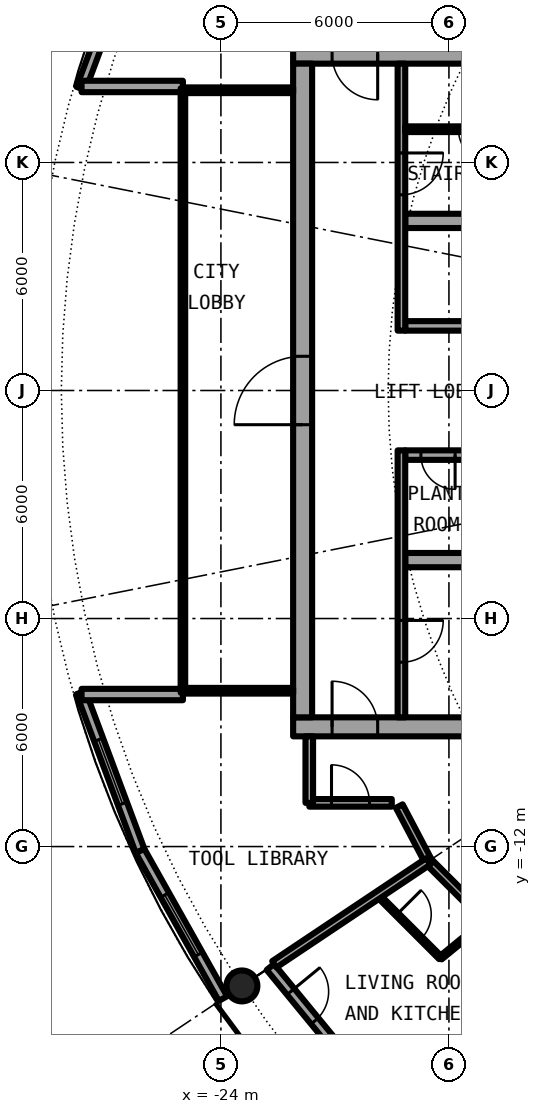
"""IFC4 building model, lengths in metres.
Left out: names, types, materials, properties, quantities, classifications, styles, units other than length and angle.
Written with IfcOpenShell. Run it as: python <this file> out.ifc"""

import sys

from ifc_helpers import new_model, si_unit, direction, frame, frame_2d, origin, origin_2d, place, context, subcontext, project, spatial, rectangle, hollow_circle, extrude, element, fill, save


model = new_model("IFC4")
c1 = context("Model", 3, precision=1e-05, world=origin(), true_north=direction((0.0, 1.0)))
c2 = subcontext(c1, "Body", "Model", "MODEL_VIEW")
j1 = project(units=[si_unit("LENGTHUNIT", "METRE"), si_unit("PLANEANGLEUNIT", "RADIAN")], contexts=[c1])
p1 = place(None, origin())
s1 = spatial("IfcSite", under=j1, at=p1, CompositionType="ELEMENT")
p2 = place(p1, origin())
s2 = spatial("IfcBuilding", under=s1, at=p2, CompositionType="ELEMENT")
p3 = place(p2, frame((0.0, 0.0, 170.75)))
s3 = spatial("IfcBuildingStorey", under=s2, at=p3, CompositionType="ELEMENT", Elevation=170.75)
p4 = place(p3, frame((-23.448, -15.667, 0.0), z_axis=(0.0, 0.0, 1.0), x_axis=(1.0, 0.0, 0.0)))
e1 = element("IfcColumn", 1, at=p4, inside=s3, PredefinedType="COLUMN", context=c2, shape_type="SweptSolid", body=[
    extrude(hollow_circle(Radius=0.406, WallThickness=0.04, at=origin_2d()), origin(), (0.0, 0.0, 1.0), 3.05),
])
p5 = place(p3, frame((-22.699, -15.167, 0.0), z_axis=(0.0, 0.0, 1.0), x_axis=(0.634382322723, -0.773019449054, 0.0)))
e2 = element("IfcWall", 2, at=p5, inside=s3, PredefinedType="SOLIDWALL", context=c2, shape_type="SweptSolid", body=[
    extrude(rectangle(XDim=5.352, YDim=0.25, at=frame_2d((2.676, 0.0))), origin(), (0.0, 0.0, 1.0), 2.7),
])
p6 = place(p5, frame((0.841, 0.0, 0.0)))
e3 = element("IfcOpeningElement", 3, at=p6, cuts=e2, PredefinedType="OPENING", context=c2, shape_type="SweptSolid", body=[
    extrude(rectangle(XDim=1.0, YDim=2.2, at=frame_2d((0.5, 1.1))), frame((0.0, 0.135, 0.0), z_axis=(0.0, -1.0, 0.0), x_axis=(1.0, 0.0, 0.0)), (0.0, 0.0, 1.0), 0.27),
])
p7 = place(p5, frame((3.111, 0.0, 0.3)))
e4 = element("IfcOpeningElement", 4, at=p7, cuts=e2, PredefinedType="OPENING", context=c2, shape_type="SweptSolid", body=[
    extrude(rectangle(XDim=1.8, YDim=2.1, at=frame_2d((0.9, 1.05))), frame((0.0, 0.135, 0.0), z_axis=(0.0, -1.0, 0.0), x_axis=(1.0, 0.0, 0.0)), (0.0, 0.0, 1.0), 0.27),
])
p8 = place(p3, frame((-27.682, -7.945, 0.0), z_axis=(0.0, 0.0, 1.0), x_axis=(0.349247811493, -0.937030397675, 0.0)))
e5 = element("IfcWall", 5, at=p8, inside=s3, PredefinedType="SOLIDWALL", context=c2, shape_type="SweptSolid", body=[
    extrude(rectangle(XDim=4.452, YDim=0.25, at=frame_2d((2.226, 0.0))), origin(), (0.0, 0.0, 1.0), 2.7),
])
p9 = place(p8, frame((1.327, 0.0, 0.3)))
e6 = element("IfcOpeningElement", 6, at=p9, cuts=e5, PredefinedType="OPENING", context=c2, shape_type="SweptSolid", body=[
    extrude(rectangle(XDim=1.8, YDim=2.1, at=frame_2d((0.9, 1.05))), frame((0.0, 0.135, 0.0), z_axis=(0.0, -1.0, 0.0), x_axis=(1.0, 0.0, 0.0)), (0.0, 0.0, 1.0), 0.27),
])
p10 = place(p3, frame((-26.127, -12.117, 0.0), z_axis=(0.0, 0.0, 1.0), x_axis=(0.489696356642, -0.871893042919, 0.0)))
e7 = element("IfcWall", 7, at=p10, inside=s3, PredefinedType="SOLIDWALL", context=c2, shape_type="SweptSolid", body=[
    extrude(rectangle(XDim=4.454, YDim=0.25, at=frame_2d((2.227, 0.0))), origin(), (0.0, 0.0, 1.0), 2.7),
])
p11 = place(p10, frame((1.327, 0.0, 0.3)))
e8 = element("IfcOpeningElement", 8, at=p11, cuts=e7, PredefinedType="OPENING", context=c2, shape_type="SweptSolid", body=[
    extrude(rectangle(XDim=1.8, YDim=2.1, at=frame_2d((0.9, 1.05))), frame((0.0, 0.135, 0.0), z_axis=(0.0, -1.0, 0.0), x_axis=(1.0, 0.0, 0.0)), (0.0, 0.0, 1.0), 0.27),
])
p12 = place(p3, frame((-26.127, 12.117, 0.0), z_axis=(0.0, 0.0, 1.0), x_axis=(-0.349247811493, -0.937030397675, 0.0)))
e9 = element("IfcWall", 9, at=p12, inside=s3, PredefinedType="SOLIDWALL", context=c2, shape_type="SweptSolid", body=[
    extrude(rectangle(XDim=4.452, YDim=0.25, at=frame_2d((2.226, 0.0))), origin(), (0.0, 0.0, 1.0), 2.7),
])
p13 = place(p12, frame((1.327, 0.0, 0.3)))
e10 = element("IfcOpeningElement", 10, at=p13, cuts=e9, PredefinedType="OPENING", context=c2, shape_type="SweptSolid", body=[
    extrude(rectangle(XDim=1.8, YDim=2.1, at=frame_2d((0.9, 1.05))), frame((0.0, 0.135, 0.0), z_axis=(0.0, -1.0, 0.0), x_axis=(1.0, 0.0, 0.0)), (0.0, 0.0, 1.0), 0.27),
])
for number, where, z_axis, x_axis in (
    (11, (-25.0, 8.0, 0.0), (0.0, 0.0, 1.0), (-1.0, 0.0, 0.0)),
    (12, (-25.0, -8.0, 0.0), (0.0, 0.0, 1.0), (-1.0, 0.0, 0.0)),
):
    element("IfcWall", number, at=place(p3, frame(where, z_axis=z_axis, x_axis=x_axis)), inside=s3, PredefinedType="SOLIDWALL", context=c2, shape_type="SweptSolid", body=[
        extrude(rectangle(XDim=2.667, YDim=0.3, at=frame_2d((1.333, 0.0))), origin(), (0.0, 0.0, 1.0), 2.7),
    ])
p14 = place(p3, frame((-22.1, -8.85, 0.0), z_axis=(0.0, 0.0, 1.0), x_axis=(1.0, 0.0, 0.0)))
e13 = element("IfcWall", 13, at=p14, inside=s3, PredefinedType="SHEAR", context=c2, shape_type="SweptSolid", body=[
    extrude(rectangle(XDim=13.6, YDim=0.5, at=frame_2d((6.8, 0.0))), origin(), (0.0, 0.0, 1.0), 3.05),
])
p15 = place(p14, frame((1.025, 0.0, 0.0)))
e14 = element("IfcOpeningElement", 14, at=p15, cuts=e13, PredefinedType="OPENING", context=c2, shape_type="SweptSolid", body=[
    extrude(rectangle(XDim=1.2, YDim=2.3, at=frame_2d((0.6, 1.15))), frame((0.0, 0.26, 0.0), z_axis=(0.0, -1.0, 0.0), x_axis=(1.0, 0.0, 0.0)), (0.0, 0.0, 1.0), 0.52),
])
p16 = place(p3, frame((-8.5, 8.85, 0.0), z_axis=(0.0, 0.0, 1.0), x_axis=(-1.0, 0.0, 0.0)))
e15 = element("IfcWall", 15, at=p16, inside=s3, PredefinedType="SHEAR", context=c2, shape_type="SweptSolid", body=[
    extrude(rectangle(XDim=13.6, YDim=0.5, at=frame_2d((6.8, 0.0))), origin(), (0.0, 0.0, 1.0), 3.05),
])
p17 = place(p16, frame((11.375, 0.0, 0.0)))
e16 = element("IfcOpeningElement", 16, at=p17, cuts=e15, PredefinedType="OPENING", context=c2, shape_type="SweptSolid", body=[
    extrude(rectangle(XDim=1.2, YDim=2.3, at=frame_2d((0.6, 1.15))), frame((0.0, 0.26, 0.0), z_axis=(0.0, -1.0, 0.0), x_axis=(1.0, 0.0, 0.0)), (0.0, 0.0, 1.0), 0.52),
])
p18 = place(p3, frame((-21.85, -8.6, 0.0), z_axis=(0.0, 0.0, 1.0), x_axis=(0.0, 1.0, 0.0)))
e17 = element("IfcWall", 17, at=p18, inside=s3, PredefinedType="SHEAR", context=c2, shape_type="SweptSolid", body=[
    extrude(rectangle(XDim=17.2, YDim=0.5, at=frame_2d((8.6, 0.0))), origin(), (0.0, 0.0, 1.0), 3.05),
])
p19 = place(p18, frame((7.7, 0.0, 0.0)))
e18 = element("IfcOpeningElement", 18, at=p19, cuts=e17, PredefinedType="OPENING", context=c2, shape_type="SweptSolid", body=[
    extrude(rectangle(XDim=1.8, YDim=2.3, at=frame_2d((0.9, 1.15))), frame((0.0, 0.26, 0.0), z_axis=(0.0, -1.0, 0.0), x_axis=(1.0, 0.0, 0.0)), (0.0, 0.0, 1.0), 0.52),
])
p20 = place(p3, frame((-9.0, -1.7, 0.0), z_axis=(0.0, 0.0, 1.0), x_axis=(-1.0, 0.0, 0.0)))
e19 = element("IfcWall", 19, at=p20, inside=s3, PredefinedType="SHEAR", context=c2, shape_type="SweptSolid", body=[
    extrude(rectangle(XDim=10.15, YDim=0.25, at=frame_2d((5.075, 0.0))), origin(), (0.0, 0.0, 1.0), 3.05),
])
p21 = place(p20, frame((1.663, 0.0, 0.0)))
e20 = element("IfcOpeningElement", 20, at=p21, cuts=e19, PredefinedType="OPENING", context=c2, shape_type="SweptSolid", body=[
    extrude(rectangle(XDim=0.9, YDim=2.3, at=frame_2d((0.45, 1.15))), frame((0.0, 0.135, 0.0), z_axis=(0.0, -1.0, 0.0), x_axis=(1.0, 0.0, 0.0)), (0.0, 0.0, 1.0), 0.27),
])
p22 = place(p20, frame((4.675, 0.0, 0.0)))
e21 = element("IfcOpeningElement", 21, at=p22, cuts=e19, PredefinedType="OPENING", context=c2, shape_type="SweptSolid", body=[
    extrude(rectangle(XDim=0.9, YDim=2.3, at=frame_2d((0.45, 1.15))), frame((0.0, 0.135, 0.0), z_axis=(0.0, -1.0, 0.0), x_axis=(1.0, 0.0, 0.0)), (0.0, 0.0, 1.0), 0.27),
])
p23 = place(p20, frame((8.837, 0.0, 0.0)))
e22 = element("IfcOpeningElement", 22, at=p23, cuts=e19, PredefinedType="OPENING", context=c2, shape_type="SweptSolid", body=[
    extrude(rectangle(XDim=0.9, YDim=2.3, at=frame_2d((0.45, 1.15))), frame((0.0, 0.135, 0.0), z_axis=(0.0, -1.0, 0.0), x_axis=(1.0, 0.0, 0.0)), (0.0, 0.0, 1.0), 0.27),
])
p24 = place(p3, frame((-9.0, -4.462, 0.0), z_axis=(0.0, 0.0, 1.0), x_axis=(-1.0, 0.0, 0.0)))
e23 = element("IfcWall", 23, at=p24, inside=s3, PredefinedType="SHEAR", context=c2, shape_type="SweptSolid", body=[
    extrude(rectangle(XDim=10.15, YDim=0.375, at=frame_2d((5.075, 0.0))), origin(), (0.0, 0.0, 1.0), 3.05),
])
p25 = place(p24, frame((6.6, 0.0, 0.0)))
e24 = element("IfcOpeningElement", 24, at=p25, cuts=e23, PredefinedType="OPENING", context=c2, shape_type="SweptSolid", body=[
    extrude(rectangle(XDim=1.1, YDim=2.3, at=frame_2d((0.55, 1.15))), frame((0.0, 0.198, 0.0), z_axis=(0.0, -1.0, 0.0), x_axis=(1.0, 0.0, 0.0)), (0.0, 0.0, 1.0), 0.395),
])
p26 = place(p3, frame((-19.25, -1.575, 0.0), z_axis=(0.0, 0.0, 1.0), x_axis=(0.0, -1.0, 0.0)))
e25 = element("IfcWall", 25, at=p26, inside=s3, PredefinedType="SOLIDWALL", context=c2, shape_type="SweptSolid", body=[
    extrude(rectangle(XDim=7.025, YDim=0.2, at=frame_2d((3.513, 0.0))), origin(), (0.0, 0.0, 1.0), 2.7),
])
p27 = place(p26, frame((4.475, 0.0, 0.0)))
e26 = element("IfcOpeningElement", 26, at=p27, cuts=e25, PredefinedType="OPENING", context=c2, shape_type="SweptSolid", body=[
    extrude(rectangle(XDim=1.1, YDim=2.3, at=frame_2d((0.55, 1.15))), frame((0.0, 0.11, 0.0), z_axis=(0.0, -1.0, 0.0), x_axis=(1.0, 0.0, 0.0)), (0.0, 0.0, 1.0), 0.22),
])
p28 = place(p3, frame((-9.0, 1.7, 0.0), z_axis=(0.0, 0.0, 1.0), x_axis=(-1.0, 0.0, 0.0)))
e27 = element("IfcWall", 27, at=p28, inside=s3, PredefinedType="SHEAR", context=c2, shape_type="SweptSolid", body=[
    extrude(rectangle(XDim=10.15, YDim=0.25, at=frame_2d((5.075, 0.0))), origin(), (0.0, 0.0, 1.0), 3.05),
])
p29 = place(p28, frame((0.387, 0.0, 0.0)))
e28 = element("IfcOpeningElement", 28, at=p29, cuts=e27, PredefinedType="OPENING", context=c2, shape_type="SweptSolid", body=[
    extrude(rectangle(XDim=1.1, YDim=2.3, at=frame_2d((0.55, 1.15))), frame((0.0, 0.135, 0.0), z_axis=(0.0, -1.0, 0.0), x_axis=(1.0, 0.0, 0.0)), (0.0, 0.0, 1.0), 0.27),
])
p30 = place(p28, frame((2.45, 0.0, 0.0)))
e29 = element("IfcOpeningElement", 29, at=p30, cuts=e27, PredefinedType="OPENING", context=c2, shape_type="SweptSolid", body=[
    extrude(rectangle(XDim=1.1, YDim=2.3, at=frame_2d((0.55, 1.15))), frame((0.0, 0.135, 0.0), z_axis=(0.0, -1.0, 0.0), x_axis=(1.0, 0.0, 0.0)), (0.0, 0.0, 1.0), 0.27),
])
p31 = place(p28, frame((4.45, 0.0, 0.0)))
e30 = element("IfcOpeningElement", 30, at=p31, cuts=e27, PredefinedType="OPENING", context=c2, shape_type="SweptSolid", body=[
    extrude(rectangle(XDim=1.1, YDim=2.3, at=frame_2d((0.55, 1.15))), frame((0.0, 0.135, 0.0), z_axis=(0.0, -1.0, 0.0), x_axis=(1.0, 0.0, 0.0)), (0.0, 0.0, 1.0), 0.27),
])
p32 = place(p28, frame((6.6, 0.0, 0.0)))
e31 = element("IfcOpeningElement", 31, at=p32, cuts=e27, PredefinedType="OPENING", context=c2, shape_type="SweptSolid", body=[
    extrude(rectangle(XDim=1.1, YDim=2.3, at=frame_2d((0.55, 1.15))), frame((0.0, 0.135, 0.0), z_axis=(0.0, -1.0, 0.0), x_axis=(1.0, 0.0, 0.0)), (0.0, 0.0, 1.0), 0.27),
])
p33 = place(p3, frame((-9.0, 4.462, 0.0), z_axis=(0.0, 0.0, 1.0), x_axis=(-1.0, 0.0, 0.0)))
e32 = element("IfcWall", 32, at=p33, inside=s3, PredefinedType="SHEAR", context=c2, shape_type="SweptSolid", body=[
    extrude(rectangle(XDim=10.15, YDim=0.375, at=frame_2d((5.075, 0.0))), origin(), (0.0, 0.0, 1.0), 3.05),
])
p34 = place(p3, frame((-19.25, 8.6, 0.0), z_axis=(0.0, 0.0, 1.0), x_axis=(0.0, -1.0, 0.0)))
e33 = element("IfcWall", 33, at=p34, inside=s3, PredefinedType="SOLIDWALL", context=c2, shape_type="SweptSolid", body=[
    extrude(rectangle(XDim=7.025, YDim=0.2, at=frame_2d((3.513, 0.0))), origin(), (0.0, 0.0, 1.0), 2.7),
])
p35 = place(p34, frame((2.35, 0.0, 0.0)))
e34 = element("IfcOpeningElement", 34, at=p35, cuts=e33, PredefinedType="OPENING", context=c2, shape_type="SweptSolid", body=[
    extrude(rectangle(XDim=1.1, YDim=2.3, at=frame_2d((0.55, 1.15))), frame((0.0, 0.11, 0.0), z_axis=(0.0, -1.0, 0.0), x_axis=(1.0, 0.0, 0.0)), (0.0, 0.0, 1.0), 0.22),
])
p36 = place(p3, frame((-15.45, 6.875, 0.0), z_axis=(0.0, 0.0, 1.0), x_axis=(-1.0, 0.0, 0.0)))
e35 = element("IfcWall", 35, at=p36, inside=s3, PredefinedType="PARTITIONING", context=c2, shape_type="SweptSolid", body=[
    extrude(rectangle(XDim=3.7, YDim=0.15, at=frame_2d((1.85, 0.0))), origin(), (0.0, 0.0, 1.0), 2.7),
])
p37 = place(p36, frame((1.4, 0.0, 0.0)))
e36 = element("IfcOpeningElement", 36, at=p37, cuts=e35, PredefinedType="OPENING", context=c2, shape_type="SweptSolid", body=[
    extrude(rectangle(XDim=0.9, YDim=2.3, at=frame_2d((0.45, 1.15))), frame((0.0, 0.085, 0.0), z_axis=(0.0, -1.0, 0.0), x_axis=(1.0, 0.0, 0.0)), (0.0, 0.0, 1.0), 0.17),
])
for number, where, z_axis, x_axis in (
    (37, (-22.1, 7.9, 0.0), (0.0, 0.0, 1.0), (-1.0, 0.0, 0.0)),
    (38, (-22.1, -7.9, 0.0), (0.0, 0.0, 1.0), (-1.0, 0.0, 0.0)),
):
    element("IfcWall", number, at=place(p3, frame(where, z_axis=z_axis, x_axis=x_axis)), inside=s3, PredefinedType="PARTITIONING", context=c2, shape_type="SweptSolid", body=[
        extrude(rectangle(XDim=2.84, YDim=0.15, at=frame_2d((1.42, 0.0))), origin(), (0.0, 0.0, 1.0), 2.7),
    ])
p38 = place(p3, frame((-25.0, 7.95, 0.0), z_axis=(0.0, 0.0, 1.0), x_axis=(0.0, -1.0, 0.0)))
e39 = element("IfcWall", 39, at=p38, inside=s3, PredefinedType="PARTITIONING", context=c2, shape_type="SweptSolid", body=[
    extrude(rectangle(XDim=15.9, YDim=0.12, at=frame_2d((7.95, 0.0))), origin(), (0.0, 0.0, 1.0), 2.7),
])
p39 = place(p38, frame((0.95, 0.0, 0.1)))
e40 = element("IfcOpeningElement", 40, at=p39, cuts=e39, PredefinedType="OPENING", context=c2, shape_type="SweptSolid", body=[
    extrude(rectangle(XDim=14.0, YDim=2.35, at=frame_2d((7.0, 1.175))), frame((0.0, 0.07, 0.0), z_axis=(0.0, -1.0, 0.0), x_axis=(1.0, 0.0, 0.0)), (0.0, 0.0, 1.0), 0.14),
])
p40 = place(p3, frame((-19.872, -13.278, 0.0), z_axis=(0.0, 0.0, 1.0), x_axis=(0.706897299114, -0.707316201218, 0.0)))
e41 = element("IfcWall", 41, at=p40, inside=s3, PredefinedType="PARTITIONING", context=c2, shape_type="SweptSolid", body=[
    extrude(rectangle(XDim=2.331, YDim=0.1, at=frame_2d((1.166, 0.0))), origin(), (0.0, 0.0, 1.0), 2.7),
])
p41 = place(p40, frame((0.716, 0.0, 0.0)))
e42 = element("IfcOpeningElement", 42, at=p41, cuts=e41, PredefinedType="OPENING", context=c2, shape_type="SweptSolid", body=[
    extrude(rectangle(XDim=0.9, YDim=2.3, at=frame_2d((0.45, 1.15))), frame((0.0, 0.06, 0.0), z_axis=(0.0, -1.0, 0.0), x_axis=(1.0, 0.0, 0.0)), (0.0, 0.0, 1.0), 0.12),
])
p42 = place(p3, frame((-19.307, -10.935, 0.0), z_axis=(0.0, 0.0, 1.0), x_axis=(0.465605550524, -0.884992356646, 0.0)))
e43 = element("IfcWall", 43, at=p42, inside=s3, PredefinedType="PARTITIONING", context=c2, shape_type="SweptSolid", body=[
    extrude(rectangle(XDim=1.643, YDim=0.2, at=frame_2d((0.821, 0.0))), origin(), (0.0, 0.0, 1.0), 2.7),
])
p43 = place(p3, frame((-18.542, -12.389, 0.0), z_axis=(0.0, 0.0, 1.0), x_axis=(0.707106781187, -0.707106781187, 0.0)))
e44 = element("IfcWall", 44, at=p43, inside=s3, PredefinedType="PARTITIONING", context=c2, shape_type="SweptSolid", body=[
    extrude(rectangle(XDim=8.702, YDim=0.2, at=frame_2d((4.351, 0.0))), origin(), (0.0, 0.0, 1.0), 2.7),
])
p44 = place(p43, frame((4.938, 0.0, 0.0)))
e45 = element("IfcOpeningElement", 45, at=p44, cuts=e44, PredefinedType="OPENING", context=c2, shape_type="SweptSolid", body=[
    extrude(rectangle(XDim=1.0, YDim=2.3, at=frame_2d((0.5, 1.15))), frame((0.0, 0.11, 0.0), z_axis=(0.0, -1.0, 0.0), x_axis=(1.0, 0.0, 0.0)), (0.0, 0.0, 1.0), 0.22),
])
p45 = place(p3, frame((-21.675, -10.85, 0.0), z_axis=(0.0, 0.0, 1.0), x_axis=(1.0, 0.0, 0.0)))
e46 = element("IfcWall", 46, at=p45, inside=s3, PredefinedType="PARTITIONING", context=c2, shape_type="SweptSolid", body=[
    extrude(rectangle(XDim=2.171, YDim=0.2, at=frame_2d((1.085, 0.0))), origin(), (0.0, 0.0, 1.0), 2.7),
])
p46 = place(p45, frame((0.585, 0.0, 0.0)))
e47 = element("IfcOpeningElement", 47, at=p46, cuts=e46, PredefinedType="OPENING", context=c2, shape_type="SweptSolid", body=[
    extrude(rectangle(XDim=1.0, YDim=2.3, at=frame_2d((0.5, 1.15))), frame((0.0, 0.11, 0.0), z_axis=(0.0, -1.0, 0.0), x_axis=(1.0, 0.0, 0.0)), (0.0, 0.0, 1.0), 0.22),
])
p47 = place(p3, frame((-22.595, -15.098, 0.0), z_axis=(0.0, 0.0, 1.0), x_axis=(0.831387096605, 0.55569370664, 0.0)))
e48 = element("IfcWall", 48, at=p47, inside=s3, PredefinedType="PARTITIONING", context=c2, shape_type="SweptSolid", body=[
    extrude(rectangle(XDim=4.875, YDim=0.2, at=frame_2d((2.438, 0.0))), origin(), (0.0, 0.0, 1.0), 2.7),
])
p48 = place(p3, frame((-19.216, -19.216, 0.0), z_axis=(0.0, 0.0, 1.0), x_axis=(0.707106781187, 0.707106781187, 0.0)))
e49 = element("IfcWall", 49, at=p48, inside=s3, PredefinedType="PARTITIONING", context=c2, shape_type="SweptSolid", body=[
    extrude(rectangle(XDim=3.735, YDim=0.1, at=frame_2d((1.868, 0.0))), origin(), (0.0, 0.0, 1.0), 2.7),
])
p49 = place(p48, frame((1.417, 0.0, 0.0)))
e50 = element("IfcOpeningElement", 50, at=p49, cuts=e49, PredefinedType="OPENING", context=c2, shape_type="SweptSolid", body=[
    extrude(rectangle(XDim=0.9, YDim=2.3, at=frame_2d((0.45, 1.15))), frame((0.0, 0.06, 0.0), z_axis=(0.0, -1.0, 0.0), x_axis=(1.0, 0.0, 0.0)), (0.0, 0.0, 1.0), 0.12),
])
p50 = place(p3, frame((-18.222, -14.93, 0.0), z_axis=(0.0, 0.0, 1.0), x_axis=(0.773633255921, 0.633633636523, 0.0)))
e51 = element("IfcWall", 51, at=p50, inside=s3, PredefinedType="PARTITIONING", context=c2, shape_type="SweptSolid", body=[
    extrude(rectangle(XDim=1.578, YDim=0.1, at=frame_2d((0.789, 0.0))), origin(), (0.0, 0.0, 1.0), 2.7),
])
p51 = place(p3, frame((-21.675, -10.85, 0.0), z_axis=(0.0, 0.0, 1.0), x_axis=(0.0, 1.0, 0.0)))
e52 = element("IfcWall", 52, at=p51, inside=s3, PredefinedType="PARTITIONING", context=c2, shape_type="SweptSolid", body=[
    extrude(rectangle(XDim=1.75, YDim=0.2, at=frame_2d((0.875, 0.0))), origin(), (0.0, 0.0, 1.0), 2.7),
])
p52 = place(p6, origin())
e53 = element("IfcDoor", 53, at=p52, inside=s3, OperationType="SINGLE_SWING_LEFT", PredefinedType="DOOR", context=c2, shape_type="SweptSolid", body=[
    extrude(rectangle(XDim=1.0, YDim=2.2, at=frame_2d((0.5, 1.1))), frame((0.0, 0.025, 0.0), z_axis=(0.0, -1.0, 0.0), x_axis=(1.0, 0.0, 0.0)), (0.0, 0.0, 1.0), 0.05),
])
fill(e3, e53)
p53 = place(p9, origin())
e54 = element("IfcWindow", 54, at=p53, inside=s3, PartitioningType="SINGLE_PANEL", PredefinedType="WINDOW", context=c2, shape_type="SweptSolid", body=[
    extrude(rectangle(XDim=1.8, YDim=2.1, at=frame_2d((0.9, 1.05))), frame((0.0, 0.03, 0.0), z_axis=(0.0, -1.0, 0.0), x_axis=(1.0, 0.0, 0.0)), (0.0, 0.0, 1.0), 0.06),
])
fill(e6, e54)
p54 = place(p11, origin())
e55 = element("IfcWindow", 55, at=p54, inside=s3, PartitioningType="SINGLE_PANEL", PredefinedType="WINDOW", context=c2, shape_type="SweptSolid", body=[
    extrude(rectangle(XDim=1.8, YDim=2.1, at=frame_2d((0.9, 1.05))), frame((0.0, 0.03, 0.0), z_axis=(0.0, -1.0, 0.0), x_axis=(1.0, 0.0, 0.0)), (0.0, 0.0, 1.0), 0.06),
])
fill(e8, e55)
p55 = place(p23, origin())
e56 = element("IfcDoor", 56, at=p55, inside=s3, OperationType="SINGLE_SWING_LEFT", PredefinedType="DOOR", context=c2, shape_type="SweptSolid", body=[
    extrude(rectangle(XDim=0.9, YDim=2.3, at=frame_2d((0.45, 1.15))), frame((0.0, 0.025, 0.0), z_axis=(0.0, -1.0, 0.0), x_axis=(1.0, 0.0, 0.0)), (0.0, 0.0, 1.0), 0.05),
])
fill(e22, e56)
p56 = place(p37, origin())
e57 = element("IfcDoor", 57, at=p56, inside=s3, OperationType="SINGLE_SWING_LEFT", PredefinedType="DOOR", context=c2, shape_type="SweptSolid", body=[
    extrude(rectangle(XDim=0.9, YDim=2.3, at=frame_2d((0.45, 1.15))), frame((0.0, 0.025, 0.0), z_axis=(0.0, -1.0, 0.0), x_axis=(1.0, 0.0, 0.0)), (0.0, 0.0, 1.0), 0.05),
])
fill(e36, e57)
p57 = place(p27, origin())
e58 = element("IfcDoor", 58, at=p57, inside=s3, OperationType="SINGLE_SWING_LEFT", PredefinedType="DOOR", context=c2, shape_type="SweptSolid", body=[
    extrude(rectangle(XDim=1.1, YDim=2.3, at=frame_2d((0.55, 1.15))), frame((0.0, 0.025, 0.0), z_axis=(0.0, -1.0, 0.0), x_axis=(1.0, 0.0, 0.0)), (0.0, 0.0, 1.0), 0.05),
])
fill(e26, e58)
p58 = place(p35, origin())
e59 = element("IfcDoor", 59, at=p58, inside=s3, OperationType="SINGLE_SWING_RIGHT", PredefinedType="DOOR", context=c2, shape_type="SweptSolid", body=[
    extrude(rectangle(XDim=1.1, YDim=2.3, at=frame_2d((0.55, 1.15))), frame((0.0, 0.025, 0.0), z_axis=(0.0, -1.0, 0.0), x_axis=(1.0, 0.0, 0.0)), (0.0, 0.0, 1.0), 0.05),
])
fill(e34, e59)
p59 = place(p15, origin())
e60 = element("IfcDoor", 60, at=p59, inside=s3, OperationType="SINGLE_SWING_RIGHT", PredefinedType="DOOR", context=c2, shape_type="SweptSolid", body=[
    extrude(rectangle(XDim=1.2, YDim=2.3, at=frame_2d((0.6, 1.15))), frame((0.0, 0.025, 0.0), z_axis=(0.0, -1.0, 0.0), x_axis=(1.0, 0.0, 0.0)), (0.0, 0.0, 1.0), 0.05),
])
fill(e14, e60)
p60 = place(p17, origin())
e61 = element("IfcDoor", 61, at=p60, inside=s3, OperationType="SINGLE_SWING_LEFT", PredefinedType="DOOR", context=c2, shape_type="SweptSolid", body=[
    extrude(rectangle(XDim=1.2, YDim=2.3, at=frame_2d((0.6, 1.15))), frame((0.0, 0.025, 0.0), z_axis=(0.0, -1.0, 0.0), x_axis=(1.0, 0.0, 0.0)), (0.0, 0.0, 1.0), 0.05),
])
fill(e16, e61)
p61 = place(p19, origin())
e62 = element("IfcDoor", 62, at=p61, inside=s3, OperationType="SINGLE_SWING_LEFT", PredefinedType="DOOR", context=c2, shape_type="SweptSolid", body=[
    extrude(rectangle(XDim=1.8, YDim=2.3, at=frame_2d((0.9, 1.15))), frame((0.0, 0.025, 0.0), z_axis=(0.0, -1.0, 0.0), x_axis=(1.0, 0.0, 0.0)), (0.0, 0.0, 1.0), 0.05),
])
fill(e18, e62)
p62 = place(p39, origin())
e63 = element("IfcWindow", 63, at=p62, inside=s3, PartitioningType="SINGLE_PANEL", PredefinedType="WINDOW", context=c2, shape_type="SweptSolid", body=[
    extrude(rectangle(XDim=14.0, YDim=2.35, at=frame_2d((7.0, 1.175))), frame((0.0, 0.03, 0.0), z_axis=(0.0, -1.0, 0.0), x_axis=(1.0, 0.0, 0.0)), (0.0, 0.0, 1.0), 0.06),
])
fill(e40, e63)
p63 = place(p41, origin())
e64 = element("IfcDoor", 64, at=p63, inside=s3, OperationType="SINGLE_SWING_RIGHT", PredefinedType="DOOR", context=c2, shape_type="SweptSolid", body=[
    extrude(rectangle(XDim=0.9, YDim=2.3, at=frame_2d((0.45, 1.15))), frame((0.0, 0.025, 0.0), z_axis=(0.0, -1.0, 0.0), x_axis=(1.0, 0.0, 0.0)), (0.0, 0.0, 1.0), 0.05),
])
fill(e42, e64)
p64 = place(p46, origin())
e65 = element("IfcDoor", 65, at=p64, inside=s3, OperationType="SINGLE_SWING_LEFT", PredefinedType="DOOR", context=c2, shape_type="SweptSolid", body=[
    extrude(rectangle(XDim=1.0, YDim=2.3, at=frame_2d((0.5, 1.15))), frame((0.0, 0.025, 0.0), z_axis=(0.0, -1.0, 0.0), x_axis=(1.0, 0.0, 0.0)), (0.0, 0.0, 1.0), 0.05),
])
fill(e47, e65)
save(model, sys.argv[1])
